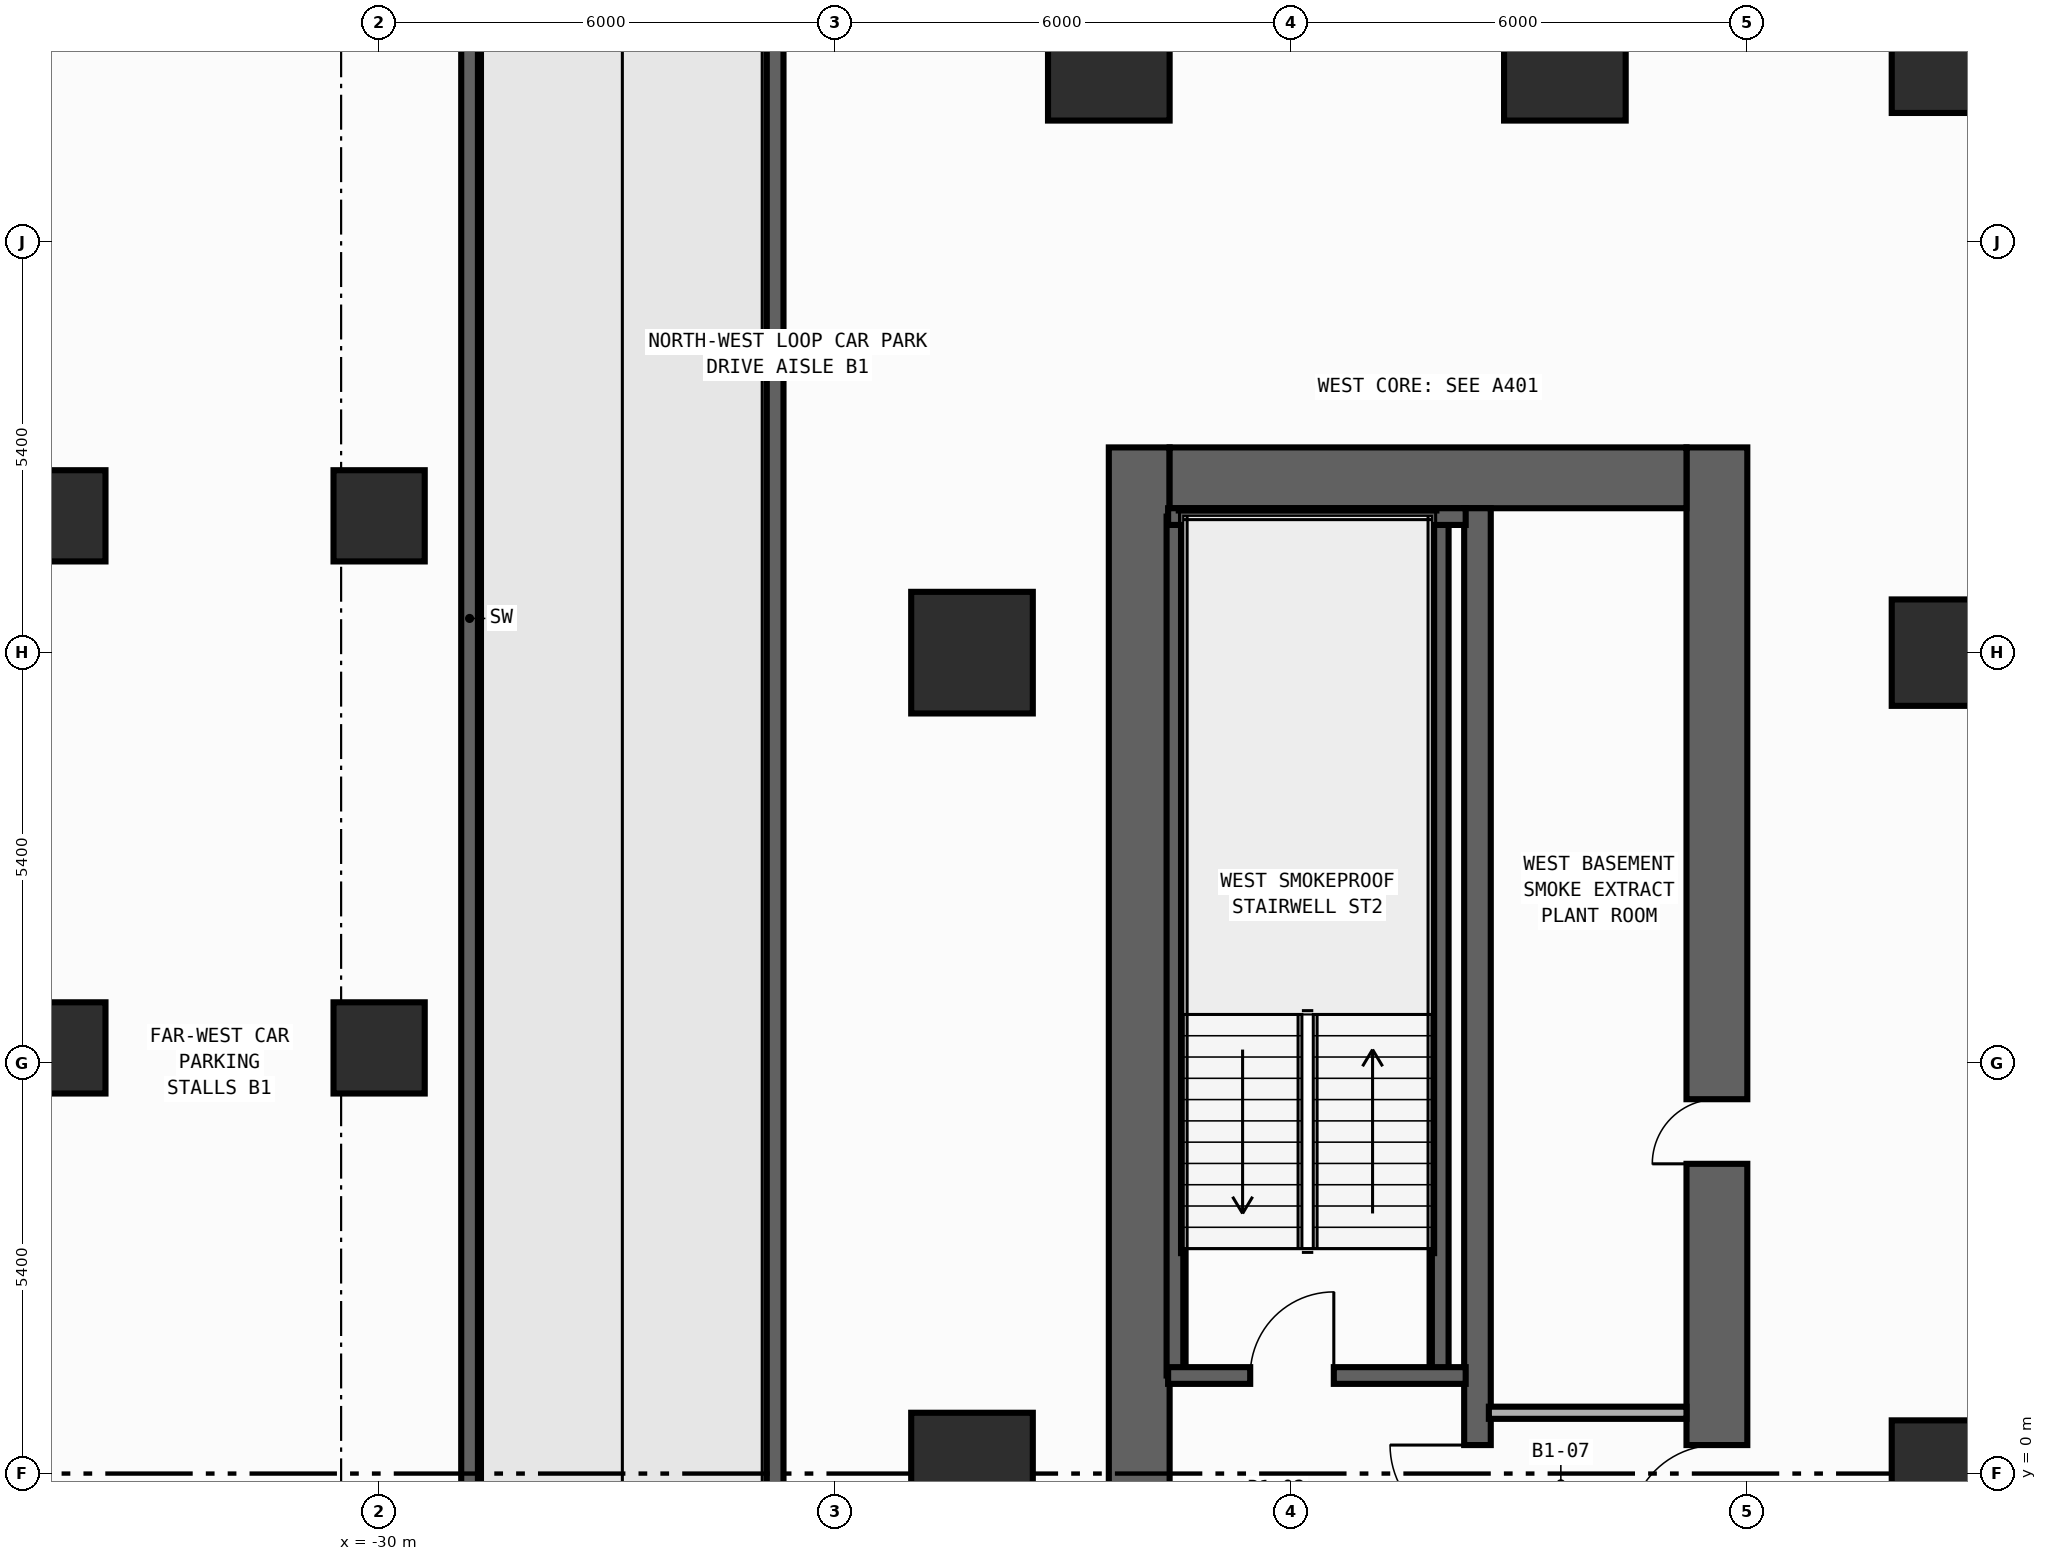
"""IFC4 building model, lengths in metres.
Left out: names, types, materials, properties, quantities, classifications, styles, units other than length and angle.
Written with IfcOpenShell. Run it as: python <this file> out.ifc"""

import sys

from ifc_helpers import new_model, si_unit, direction, frame, frame_2d, origin, origin_2d, place, context, subcontext, project, spatial, polyline, rectangle, outline, extrude, element, fill, save


model = new_model("IFC4")
c1 = context("Model", 3, precision=1e-05, world=origin(), true_north=direction((0.0, 1.0)))
c2 = subcontext(c1, "Body", "Model", "MODEL_VIEW")
j1 = project(units=[si_unit("LENGTHUNIT", "METRE"), si_unit("PLANEANGLEUNIT", "RADIAN")], contexts=[c1])
p1 = place(None, origin())
s1 = spatial("IfcSite", under=j1, at=p1, CompositionType="ELEMENT")
p2 = place(p1, origin())
s2 = spatial("IfcBuilding", under=s1, at=p2, CompositionType="ELEMENT")
p3 = place(p2, frame((0.0, 0.0, -4.5)))
s3 = spatial("IfcBuildingStorey", under=s2, at=p3, CompositionType="ELEMENT", Elevation=-4.5)
p4 = place(p3, frame((-20.0, -13.5, 0.0), z_axis=(0.0, 0.0, 1.0), x_axis=(0.0, 1.0, 0.0)))
e1 = element("IfcWall", 1, at=p4, inside=s3, PredefinedType="SHEAR", context=c2, shape_type="SweptSolid", body=[
    extrude(rectangle(XDim=27.0, YDim=0.8, at=frame_2d((13.5, 0.0))), origin(), (0.0, 0.0, 1.0), 4.2),
])
p5 = place(p3, frame((-12.4, -13.5, 0.0), z_axis=(0.0, 0.0, 1.0), x_axis=(0.0, 1.0, 0.0)))
e2 = element("IfcWall", 2, at=p5, inside=s3, PredefinedType="SHEAR", context=c2, shape_type="SweptSolid", body=[
    extrude(rectangle(XDim=27.0, YDim=0.8, at=frame_2d((13.5, 0.0))), origin(), (0.0, 0.0, 1.0), 4.2),
])
p6 = place(p5, frame((17.575, 0.0, 0.0)))
e3 = element("IfcOpeningElement", 3, at=p6, cuts=e2, PredefinedType="OPENING", context=c2, shape_type="SweptSolid", body=[
    extrude(rectangle(XDim=0.85, YDim=2.1, at=frame_2d((0.425, 1.05))), frame((0.0, 0.41, 0.0), z_axis=(0.0, -1.0, 0.0), x_axis=(1.0, 0.0, 0.0)), (0.0, 0.0, 1.0), 0.82),
])
p7 = place(p5, frame((7.575, 0.0, 0.0)))
e4 = element("IfcOpeningElement", 4, at=p7, cuts=e2, PredefinedType="OPENING", context=c2, shape_type="SweptSolid", body=[
    extrude(rectangle(XDim=0.85, YDim=2.1, at=frame_2d((0.425, 1.05))), frame((0.0, 0.41, 0.0), z_axis=(0.0, -1.0, 0.0), x_axis=(1.0, 0.0, 0.0)), (0.0, 0.0, 1.0), 0.82),
])
p8 = place(p5, frame((12.725, 0.0, 0.0)))
e5 = element("IfcOpeningElement", 5, at=p8, cuts=e2, PredefinedType="OPENING", context=c2, shape_type="SweptSolid", body=[
    extrude(rectangle(XDim=1.15, YDim=2.2, at=frame_2d((0.575, 1.1))), frame((0.0, 0.41, 0.0), z_axis=(0.0, -1.0, 0.0), x_axis=(1.0, 0.0, 0.0)), (0.0, 0.0, 1.0), 0.82),
])
p9 = place(p5, frame((1.625, 0.0, 0.0)))
e6 = element("IfcOpeningElement", 6, at=p9, cuts=e2, PredefinedType="OPENING", context=c2, shape_type="SweptSolid", body=[
    extrude(rectangle(XDim=0.85, YDim=2.1, at=frame_2d((0.425, 1.05))), frame((0.0, 0.41, 0.0), z_axis=(0.0, -1.0, 0.0), x_axis=(1.0, 0.0, 0.0)), (0.0, 0.0, 1.0), 0.82),
])
p10 = place(p3, frame((-19.6, 13.1, 0.0), z_axis=(0.0, 0.0, 1.0), x_axis=(1.0, 0.0, 0.0)))
e7 = element("IfcWall", 7, at=p10, inside=s3, PredefinedType="SHEAR", context=c2, shape_type="SweptSolid", body=[
    extrude(rectangle(XDim=6.8, YDim=0.8, at=frame_2d((3.4, 0.0))), origin(), (0.0, 0.0, 1.0), 4.2),
])
p11 = place(p3, frame((-15.55, -12.7, 0.0), z_axis=(0.0, 0.0, 1.0), x_axis=(0.0, 1.0, 0.0)))
e8 = element("IfcWall", 8, at=p11, inside=s3, PredefinedType="SHEAR", context=c2, shape_type="SweptSolid", body=[
    extrude(rectangle(XDim=25.4, YDim=0.35, at=frame_2d((12.7, 0.0))), origin(), (0.0, 0.0, 1.0), 4.2),
])
p12 = place(p11, frame((11.925, 0.0, 0.0)))
e9 = element("IfcOpeningElement", 9, at=p12, cuts=e8, PredefinedType="OPENING", context=c2, shape_type="SweptSolid", body=[
    extrude(rectangle(XDim=1.15, YDim=2.2, at=frame_2d((0.575, 1.1))), frame((0.0, 0.185, 0.0), z_axis=(0.0, -1.0, 0.0), x_axis=(1.0, 0.0, 0.0)), (0.0, 0.0, 1.0), 0.37),
])
p13 = place(p11, frame((0.825, 0.0, 0.0)))
e10 = element("IfcOpeningElement", 10, at=p13, cuts=e8, PredefinedType="OPENING", context=c2, shape_type="SweptSolid", body=[
    extrude(rectangle(XDim=0.85, YDim=2.1, at=frame_2d((0.425, 1.05))), frame((0.0, 0.185, 0.0), z_axis=(0.0, -1.0, 0.0), x_axis=(1.0, 0.0, 0.0)), (0.0, 0.0, 1.0), 0.37),
])
for number, where, z_axis, x_axis in (
    (11, (-16.04, 1.29, 0.0), (0.0, 0.0, 1.0), (0.0, 1.0, 0.0)),
    (12, (-19.53, 1.29, 0.0), (0.0, 0.0, 1.0), (0.0, 1.0, 0.0)),
):
    element("IfcWall", number, at=place(p3, frame(where, z_axis=z_axis, x_axis=x_axis)), inside=s3, PredefinedType="SHEAR", context=c2, shape_type="SweptSolid", body=[
        extrude(rectangle(XDim=11.3, YDim=0.22, at=frame_2d((5.65, 0.0))), origin(), (0.0, 0.0, 1.0), 4.2),
    ])
p14 = place(p3, frame((-19.62, 12.59, 0.0), z_axis=(0.0, 0.0, 1.0), x_axis=(1.0, 0.0, 0.0)))
e13 = element("IfcWall", 13, at=p14, inside=s3, PredefinedType="SHEAR", context=c2, shape_type="SweptSolid", body=[
    extrude(rectangle(XDim=3.915, YDim=0.22, at=frame_2d((1.958, 0.0))), origin(), (0.0, 0.0, 1.0), 4.2),
])
p15 = place(p3, frame((-19.62, 1.29, 0.0), z_axis=(0.0, 0.0, 1.0), x_axis=(1.0, 0.0, 0.0)))
e14 = element("IfcWall", 14, at=p15, inside=s3, PredefinedType="SHEAR", context=c2, shape_type="SweptSolid", body=[
    extrude(rectangle(XDim=3.915, YDim=0.22, at=frame_2d((1.958, 0.0))), origin(), (0.0, 0.0, 1.0), 4.2),
])
p16 = place(p15, frame((1.08, 0.0, 0.0)))
e15 = element("IfcOpeningElement", 15, at=p16, cuts=e14, PredefinedType="OPENING", context=c2, shape_type="SweptSolid", body=[
    extrude(rectangle(XDim=1.1, YDim=2.2, at=frame_2d((0.55, 1.1))), frame((0.0, 0.12, 0.0), z_axis=(0.0, -1.0, 0.0), x_axis=(1.0, 0.0, 0.0)), (0.0, 0.0, 1.0), 0.24),
])
for number, where, z_axis, x_axis in (
    (16, (-9.2, 0.0, 0.0), (0.0, 0.0, 1.0), (1.0, 0.0, 0.0)),
    (17, (-9.2, 10.8, 0.0), (0.0, 0.0, 1.0), (1.0, 0.0, 0.0)),
    (18, (-9.2, 18.6, 0.0), (0.0, 0.0, 1.0), (1.0, 0.0, 0.0)),
):
    element("IfcColumn", number, at=place(p3, frame(where, z_axis=z_axis, x_axis=x_axis)), inside=s3, PredefinedType="COLUMN", context=c2, shape_type="SweptSolid", body=[
        extrude(rectangle(XDim=1.8, YDim=1.4, at=origin_2d()), origin(), (0.0, 0.0, 1.0), 4.5),
    ])
for number, where, z_axis, x_axis in (
    (19, (-20.4, 18.6, 0.0), (0.0, 0.0, 1.0), (1.0, 0.0, 0.0)),
    (20, (-14.4, 18.6, 0.0), (0.0, 0.0, 1.0), (1.0, 0.0, 0.0)),
):
    element("IfcColumn", number, at=place(p3, frame(where, z_axis=z_axis, x_axis=x_axis)), inside=s3, PredefinedType="COLUMN", context=c2, shape_type="SweptSolid", body=[
        extrude(rectangle(XDim=1.6, YDim=1.6, at=origin_2d()), origin(), (0.0, 0.0, 1.0), 4.5),
    ])
for number, where, z_axis, x_axis in (
    (21, (-34.2, 5.6, 0.0), (0.0, 0.0, 1.0), (1.0, 0.0, 0.0)),
    (22, (-34.2, 12.6, 0.0), (0.0, 0.0, 1.0), (1.0, 0.0, 0.0)),
    (23, (-30.0, 5.6, 0.0), (0.0, 0.0, 1.0), (1.0, 0.0, 0.0)),
    (24, (-30.0, 12.6, 0.0), (0.0, 0.0, 1.0), (1.0, 0.0, 0.0)),
):
    element("IfcColumn", number, at=place(p3, frame(where, z_axis=z_axis, x_axis=x_axis)), inside=s3, PredefinedType="COLUMN", context=c2, shape_type="SweptSolid", body=[
        extrude(rectangle(XDim=1.2, YDim=1.2, at=origin_2d()), origin(), (0.0, 0.0, 1.0), 4.5),
    ])
for number, where, z_axis, x_axis in (
    (25, (-22.2, 0.0, 0.0), (0.0, 0.0, 1.0), (1.0, 0.0, 0.0)),
    (26, (-22.2, 10.8, 0.0), (0.0, 0.0, 1.0), (1.0, 0.0, 0.0)),
):
    element("IfcColumn", number, at=place(p3, frame(where, z_axis=z_axis, x_axis=x_axis)), inside=s3, PredefinedType="COLUMN", context=c2, shape_type="SweptSolid", body=[
        extrude(rectangle(XDim=1.6, YDim=1.6, at=origin_2d()), origin(), (0.0, 0.0, 1.0), 4.5),
    ])
for number, where, z_axis, x_axis in (
    (27, (-28.81, -3.84, 0.0), (0.0, 0.0, 1.0), (0.0, 1.0, 0.0)),
    (28, (-24.79, -3.84, 0.0), (0.0, 0.0, 1.0), (0.0, 1.0, 0.0)),
):
    element("IfcWall", number, at=place(p3, frame(where, z_axis=z_axis, x_axis=x_axis)), inside=s3, PredefinedType="SHEAR", context=c2, shape_type="SweptSolid", body=[
        extrude(outline(polyline([(0.0, 0.0), (30.18, 0.0), (30.18, 4.2), (0.0, 0.02), (0.0, 0.0)])), frame((0.0, 0.11, 0.0), z_axis=(0.0, -1.0, 0.0), x_axis=(1.0, 0.0, 0.0)), (0.0, 0.0, 1.0), 0.22),
    ])
p17 = place(p3, frame((-15.4, 0.8, 0.0), z_axis=(0.0, 0.0, 1.0), x_axis=(1.0, 0.0, 0.0)))
e29 = element("IfcWall", 29, at=p17, inside=s3, PredefinedType="STANDARD", context=c2, shape_type="SweptSolid", body=[
    extrude(rectangle(XDim=2.6, YDim=0.16, at=frame_2d((1.3, 0.0))), origin(), (0.0, 0.0, 1.0), 4.2),
])
p18 = place(p16, origin())
e30 = element("IfcDoor", 30, at=p18, inside=s3, OperationType="SINGLE_SWING_RIGHT", PredefinedType="DOOR", context=c2, shape_type="SweptSolid", body=[
    extrude(rectangle(XDim=1.1, YDim=2.2, at=frame_2d((0.55, 1.1))), frame((0.0, 0.025, 0.0), z_axis=(0.0, -1.0, 0.0), x_axis=(1.0, 0.0, 0.0)), (0.0, 0.0, 1.0), 0.05),
])
fill(e15, e30)
p19 = place(p6, origin())
e31 = element("IfcDoor", 31, at=p19, inside=s3, OperationType="SINGLE_SWING_LEFT", PredefinedType="DOOR", context=c2, shape_type="SweptSolid", body=[
    extrude(rectangle(XDim=0.85, YDim=2.1, at=frame_2d((0.425, 1.05))), frame((0.0, 0.025, 0.0), z_axis=(0.0, -1.0, 0.0), x_axis=(1.0, 0.0, 0.0)), (0.0, 0.0, 1.0), 0.05),
])
fill(e3, e31)
p20 = place(p8, origin())
e32 = element("IfcDoor", 32, at=p20, inside=s3, OperationType="SINGLE_SWING_LEFT", PredefinedType="DOOR", context=c2, shape_type="SweptSolid", body=[
    extrude(rectangle(XDim=1.15, YDim=2.2, at=frame_2d((0.575, 1.1))), frame((0.0, 0.025, 0.0), z_axis=(0.0, -1.0, 0.0), x_axis=(1.0, 0.0, 0.0)), (0.0, 0.0, 1.0), 0.05),
])
fill(e5, e32)
p21 = place(p12, origin())
e33 = element("IfcDoor", 33, at=p21, inside=s3, OperationType="SINGLE_SWING_RIGHT", PredefinedType="DOOR", context=c2, shape_type="SweptSolid", body=[
    extrude(rectangle(XDim=1.15, YDim=2.2, at=frame_2d((0.575, 1.1))), frame((0.0, 0.025, 0.0), z_axis=(0.0, -1.0, 0.0), x_axis=(1.0, 0.0, 0.0)), (0.0, 0.0, 1.0), 0.05),
])
fill(e9, e33)
save(model, sys.argv[1])
